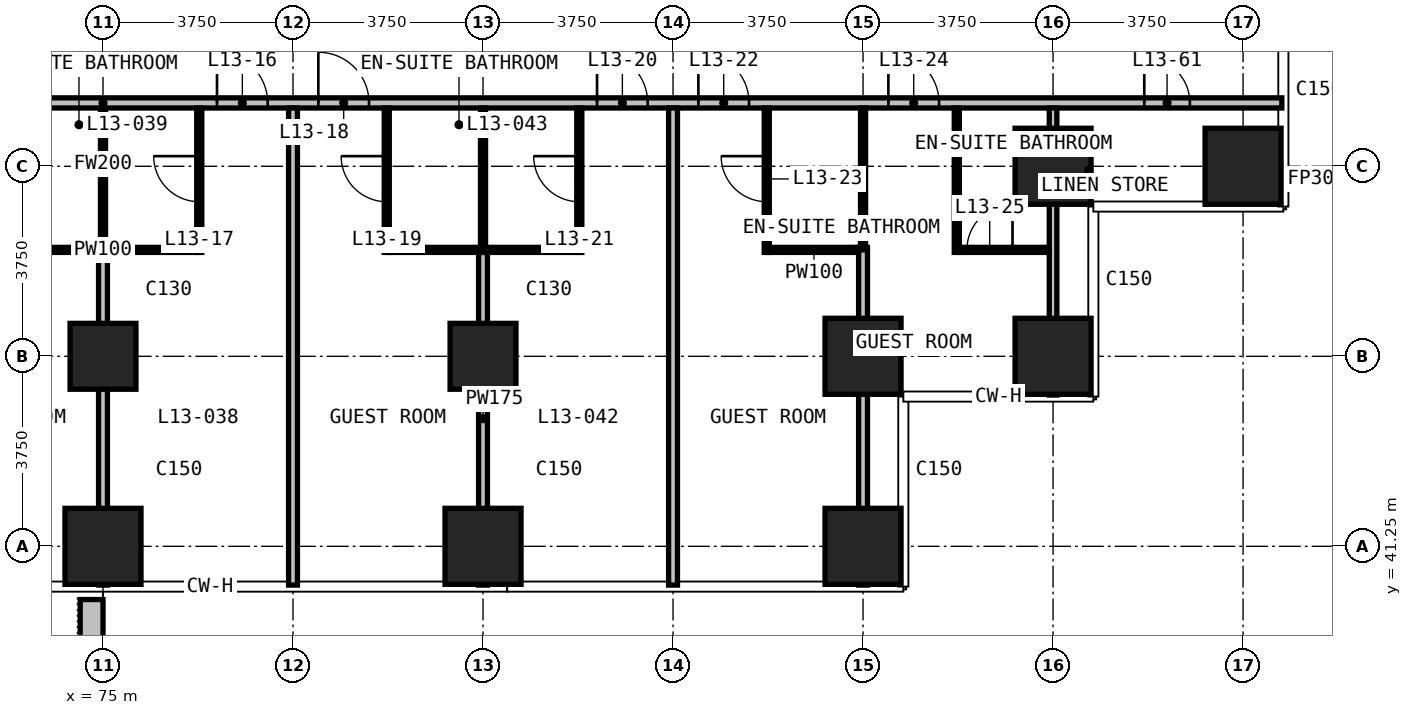
"""IFC4 building model, lengths in metres.
Left out: names, types, materials, properties, quantities, classifications, styles, units other than length and angle.
Written with IfcOpenShell. Run it as: python <this file> out.ifc"""

import sys

from ifc_helpers import new_model, si_unit, direction, frame, frame_2d, origin, origin_2d, place, context, subcontext, project, spatial, rectangle, extrude, element, fill, save


model = new_model("IFC4")
c1 = context("Model", 3, precision=1e-05, world=origin(), true_north=direction((0.0, 1.0)))
c2 = subcontext(c1, "Body", "Model", "MODEL_VIEW")
j1 = project(units=[si_unit("LENGTHUNIT", "METRE"), si_unit("PLANEANGLEUNIT", "RADIAN")], contexts=[c1])
p1 = place(None, origin())
s1 = spatial("IfcSite", under=j1, at=p1, CompositionType="ELEMENT")
p2 = place(p1, origin())
s2 = spatial("IfcBuilding", under=s1, at=p2, CompositionType="ELEMENT")
p3 = place(p2, frame((0.0, 0.0, 62.6)))
s3 = spatial("IfcBuildingStorey", under=s2, at=p3, CompositionType="ELEMENT", Elevation=62.6)
p4 = place(p3, frame((75.0, 41.25, 0.0), z_axis=(0.0, 0.0, 1.0), x_axis=(1.0, 0.0, 0.0)))
e1 = element("IfcColumn", 1, at=p4, inside=s3, PredefinedType="COLUMN", context=c2, shape_type="SweptSolid", body=[
    extrude(rectangle(XDim=1.5, YDim=1.5, at=origin_2d()), origin(), (0.0, 0.0, 1.0), 3.3),
])
p5 = place(p3, frame((75.0, 45.0, 0.0), z_axis=(0.0, 0.0, 1.0), x_axis=(1.0, 0.0, 0.0)))
e2 = element("IfcColumn", 2, at=p5, inside=s3, PredefinedType="COLUMN", context=c2, shape_type="SweptSolid", body=[
    extrude(rectangle(XDim=1.3, YDim=1.3, at=origin_2d()), origin(), (0.0, 0.0, 1.0), 3.3),
])
p6 = place(p3, frame((82.5, 41.25, 0.0), z_axis=(0.0, 0.0, 1.0), x_axis=(1.0, 0.0, 0.0)))
e3 = element("IfcColumn", 3, at=p6, inside=s3, PredefinedType="COLUMN", context=c2, shape_type="SweptSolid", body=[
    extrude(rectangle(XDim=1.5, YDim=1.5, at=origin_2d()), origin(), (0.0, 0.0, 1.0), 3.3),
])
p7 = place(p3, frame((82.5, 45.0, 0.0), z_axis=(0.0, 0.0, 1.0), x_axis=(1.0, 0.0, 0.0)))
e4 = element("IfcColumn", 4, at=p7, inside=s3, PredefinedType="COLUMN", context=c2, shape_type="SweptSolid", body=[
    extrude(rectangle(XDim=1.3, YDim=1.3, at=origin_2d()), origin(), (0.0, 0.0, 1.0), 3.3),
])
for number, where, z_axis, x_axis in (
    (5, (90.0, 41.25, 0.0), (0.0, 0.0, 1.0), (1.0, 0.0, 0.0)),
    (6, (90.0, 45.0, 0.0), (0.0, 0.0, 1.0), (1.0, 0.0, 0.0)),
    (7, (93.75, 45.0, 0.0), (0.0, 0.0, 1.0), (1.0, 0.0, 0.0)),
    (8, (93.75, 48.75, 0.0), (0.0, 0.0, 1.0), (1.0, 0.0, 0.0)),
    (9, (97.5, 48.75, 0.0), (0.0, 0.0, 1.0), (1.0, 0.0, 0.0)),
):
    element("IfcColumn", number, at=place(p3, frame(where, z_axis=z_axis, x_axis=x_axis)), inside=s3, PredefinedType="COLUMN", context=c2, shape_type="SweptSolid", body=[
        extrude(rectangle(XDim=1.5, YDim=1.5, at=origin_2d()), origin(), (0.0, 0.0, 1.0), 3.3),
    ])
p8 = place(p3, frame((74.775, 40.2, 0.0), z_axis=(0.0, 0.0, 1.0), x_axis=(0.0, -1.0, 0.0)))
e10 = element("IfcWall", 10, at=p8, inside=s3, PredefinedType="USERDEFINED", context=c2, shape_type="SweptSolid", body=[
    extrude(rectangle(XDim=2.35, YDim=0.45, at=frame_2d((1.175, 0.0))), origin(), (0.0, 0.0, 1.0), 1.1),
])
p9 = place(p3, frame((51.735, 50.0, 0.0), z_axis=(0.0, 0.0, 1.0), x_axis=(1.0, 0.0, 0.0)))
e11 = element("IfcWall", 11, at=p9, inside=s3, PredefinedType="PARTITIONING", context=c2, shape_type="SweptSolid", body=[
    extrude(rectangle(XDim=46.53, YDim=0.2, at=frame_2d((23.265, 0.0))), origin(), (0.0, 0.0, 1.0), 3.0),
])
p10 = place(p9, frame((6.765, 0.0, 0.0)))
e12 = element("IfcOpeningElement", 12, at=p10, cuts=e11, PredefinedType="OPENING", context=c2, shape_type="SweptSolid", body=[
    extrude(rectangle(XDim=1.0, YDim=2.2, at=frame_2d((0.5, 1.1))), frame((0.0, 0.11, 0.0), z_axis=(0.0, -1.0, 0.0), x_axis=(1.0, 0.0, 0.0)), (0.0, 0.0, 1.0), 0.22),
])
p11 = place(p9, frame((10.515, 0.0, 0.0)))
e13 = element("IfcOpeningElement", 13, at=p11, cuts=e11, PredefinedType="OPENING", context=c2, shape_type="SweptSolid", body=[
    extrude(rectangle(XDim=1.0, YDim=2.2, at=frame_2d((0.5, 1.1))), frame((0.0, 0.11, 0.0), z_axis=(0.0, -1.0, 0.0), x_axis=(1.0, 0.0, 0.0)), (0.0, 0.0, 1.0), 0.22),
])
p12 = place(p9, frame((12.515, 0.0, 0.0)))
e14 = element("IfcOpeningElement", 14, at=p12, cuts=e11, PredefinedType="OPENING", context=c2, shape_type="SweptSolid", body=[
    extrude(rectangle(XDim=1.0, YDim=2.2, at=frame_2d((0.5, 1.1))), frame((0.0, 0.11, 0.0), z_axis=(0.0, -1.0, 0.0), x_axis=(1.0, 0.0, 0.0)), (0.0, 0.0, 1.0), 0.22),
])
p13 = place(p9, frame((18.015, 0.0, 0.0)))
e15 = element("IfcOpeningElement", 15, at=p13, cuts=e11, PredefinedType="OPENING", context=c2, shape_type="SweptSolid", body=[
    extrude(rectangle(XDim=1.0, YDim=2.2, at=frame_2d((0.5, 1.1))), frame((0.0, 0.11, 0.0), z_axis=(0.0, -1.0, 0.0), x_axis=(1.0, 0.0, 0.0)), (0.0, 0.0, 1.0), 0.22),
])
p14 = place(p9, frame((20.015, 0.0, 0.0)))
e16 = element("IfcOpeningElement", 16, at=p14, cuts=e11, PredefinedType="OPENING", context=c2, shape_type="SweptSolid", body=[
    extrude(rectangle(XDim=1.0, YDim=2.2, at=frame_2d((0.5, 1.1))), frame((0.0, 0.11, 0.0), z_axis=(0.0, -1.0, 0.0), x_axis=(1.0, 0.0, 0.0)), (0.0, 0.0, 1.0), 0.22),
])
p15 = place(p9, frame((25.515, 0.0, 0.0)))
e17 = element("IfcOpeningElement", 17, at=p15, cuts=e11, PredefinedType="OPENING", context=c2, shape_type="SweptSolid", body=[
    extrude(rectangle(XDim=1.0, YDim=2.2, at=frame_2d((0.5, 1.1))), frame((0.0, 0.11, 0.0), z_axis=(0.0, -1.0, 0.0), x_axis=(1.0, 0.0, 0.0)), (0.0, 0.0, 1.0), 0.22),
])
p16 = place(p9, frame((27.515, 0.0, 0.0)))
e18 = element("IfcOpeningElement", 18, at=p16, cuts=e11, PredefinedType="OPENING", context=c2, shape_type="SweptSolid", body=[
    extrude(rectangle(XDim=1.0, YDim=2.2, at=frame_2d((0.5, 1.1))), frame((0.0, 0.11, 0.0), z_axis=(0.0, -1.0, 0.0), x_axis=(1.0, 0.0, 0.0)), (0.0, 0.0, 1.0), 0.22),
])
p17 = place(p9, frame((33.015, 0.0, 0.0)))
e19 = element("IfcOpeningElement", 19, at=p17, cuts=e11, PredefinedType="OPENING", context=c2, shape_type="SweptSolid", body=[
    extrude(rectangle(XDim=1.0, YDim=2.2, at=frame_2d((0.5, 1.1))), frame((0.0, 0.11, 0.0), z_axis=(0.0, -1.0, 0.0), x_axis=(1.0, 0.0, 0.0)), (0.0, 0.0, 1.0), 0.22),
])
p18 = place(p9, frame((35.015, 0.0, 0.0)))
e20 = element("IfcOpeningElement", 20, at=p18, cuts=e11, PredefinedType="OPENING", context=c2, shape_type="SweptSolid", body=[
    extrude(rectangle(XDim=1.0, YDim=2.2, at=frame_2d((0.5, 1.1))), frame((0.0, 0.11, 0.0), z_axis=(0.0, -1.0, 0.0), x_axis=(1.0, 0.0, 0.0)), (0.0, 0.0, 1.0), 0.22),
])
p19 = place(p9, frame((38.765, 0.0, 0.0)))
e21 = element("IfcOpeningElement", 21, at=p19, cuts=e11, PredefinedType="OPENING", context=c2, shape_type="SweptSolid", body=[
    extrude(rectangle(XDim=1.0, YDim=2.2, at=frame_2d((0.5, 1.1))), frame((0.0, 0.11, 0.0), z_axis=(0.0, -1.0, 0.0), x_axis=(1.0, 0.0, 0.0)), (0.0, 0.0, 1.0), 0.22),
])
p20 = place(p9, frame((1.8, 0.0, 0.0)))
e22 = element("IfcOpeningElement", 22, at=p20, cuts=e11, PredefinedType="OPENING", context=c2, shape_type="SweptSolid", body=[
    extrude(rectangle(XDim=0.9, YDim=2.2, at=frame_2d((0.45, 1.1))), frame((0.0, 0.11, 0.0), z_axis=(0.0, -1.0, 0.0), x_axis=(1.0, 0.0, 0.0)), (0.0, 0.0, 1.0), 0.22),
])
p21 = place(p9, frame((43.815, 0.0, 0.0)))
e23 = element("IfcOpeningElement", 23, at=p21, cuts=e11, PredefinedType="OPENING", context=c2, shape_type="SweptSolid", body=[
    extrude(rectangle(XDim=0.9, YDim=2.2, at=frame_2d((0.45, 1.1))), frame((0.0, 0.11, 0.0), z_axis=(0.0, -1.0, 0.0), x_axis=(1.0, 0.0, 0.0)), (0.0, 0.0, 1.0), 0.22),
])
p22 = place(p3, frame((75.0, 40.485, 0.0), z_axis=(0.0, 0.0, 1.0), x_axis=(0.0, 1.0, 0.0)))
e24 = element("IfcWall", 24, at=p22, inside=s3, PredefinedType="PARTITIONING", context=c2, shape_type="SweptSolid", body=[
    extrude(rectangle(XDim=6.565, YDim=0.175, at=frame_2d((3.282, 0.0))), origin(), (0.0, 0.0, 1.0), 3.0),
])
p23 = place(p3, frame((78.75, 40.485, 0.0), z_axis=(0.0, 0.0, 1.0), x_axis=(0.0, 1.0, 0.0)))
e25 = element("IfcWall", 25, at=p23, inside=s3, PredefinedType="PARTITIONING", context=c2, shape_type="SweptSolid", body=[
    extrude(rectangle(XDim=9.415, YDim=0.175, at=frame_2d((4.708, 0.0))), origin(), (0.0, 0.0, 1.0), 3.0),
])
p24 = place(p3, frame((82.5, 40.485, 0.0), z_axis=(0.0, 0.0, 1.0), x_axis=(0.0, 1.0, 0.0)))
e26 = element("IfcWall", 26, at=p24, inside=s3, PredefinedType="PARTITIONING", context=c2, shape_type="SweptSolid", body=[
    extrude(rectangle(XDim=6.565, YDim=0.175, at=frame_2d((3.282, 0.0))), origin(), (0.0, 0.0, 1.0), 3.0),
])
p25 = place(p3, frame((86.25, 40.485, 0.0), z_axis=(0.0, 0.0, 1.0), x_axis=(0.0, 1.0, 0.0)))
e27 = element("IfcWall", 27, at=p25, inside=s3, PredefinedType="PARTITIONING", context=c2, shape_type="SweptSolid", body=[
    extrude(rectangle(XDim=9.415, YDim=0.175, at=frame_2d((4.708, 0.0))), origin(), (0.0, 0.0, 1.0), 3.0),
])
p26 = place(p3, frame((90.0, 40.485, 0.0), z_axis=(0.0, 0.0, 1.0), x_axis=(0.0, 1.0, 0.0)))
e28 = element("IfcWall", 28, at=p26, inside=s3, PredefinedType="PARTITIONING", context=c2, shape_type="SweptSolid", body=[
    extrude(rectangle(XDim=6.665, YDim=0.175, at=frame_2d((3.333, 0.0))), origin(), (0.0, 0.0, 1.0), 3.0),
])
p27 = place(p3, frame((93.75, 44.235, 0.0), z_axis=(0.0, 0.0, 1.0), x_axis=(0.0, 1.0, 0.0)))
e29 = element("IfcWall", 29, at=p27, inside=s3, PredefinedType="PARTITIONING", context=c2, shape_type="SweptSolid", body=[
    extrude(rectangle(XDim=5.665, YDim=0.15, at=frame_2d((2.833, 0.0))), origin(), (0.0, 0.0, 1.0), 3.0),
])
for number, where, z_axis, x_axis in (
    (30, (73.15, 47.1, 0.0), (0.0, 0.0, 1.0), (1.0, 0.0, 0.0)),
    (31, (80.65, 47.1, 0.0), (0.0, 0.0, 1.0), (1.0, 0.0, 0.0)),
):
    element("IfcWall", number, at=place(p3, frame(where, z_axis=z_axis, x_axis=x_axis)), inside=s3, PredefinedType="PARTITIONING", context=c2, shape_type="SweptSolid", body=[
        extrude(rectangle(XDim=3.7, YDim=0.1, at=frame_2d((1.85, 0.0))), origin(), (0.0, 0.0, 1.0), 3.0),
    ])
p28 = place(p3, frame((88.15, 47.1, 0.0), z_axis=(0.0, 0.0, 1.0), x_axis=(1.0, 0.0, 0.0)))
e32 = element("IfcWall", 32, at=p28, inside=s3, PredefinedType="PARTITIONING", context=c2, shape_type="SweptSolid", body=[
    extrude(rectangle(XDim=1.762, YDim=0.1, at=frame_2d((0.881, 0.0))), origin(), (0.0, 0.0, 1.0), 3.0),
])
p29 = place(p3, frame((91.9, 47.1, 0.0), z_axis=(0.0, 0.0, 1.0), x_axis=(1.0, 0.0, 0.0)))
e33 = element("IfcWall", 33, at=p29, inside=s3, PredefinedType="PARTITIONING", context=c2, shape_type="SweptSolid", body=[
    extrude(rectangle(XDim=1.775, YDim=0.1, at=frame_2d((0.888, 0.0))), origin(), (0.0, 0.0, 1.0), 3.0),
])
p30 = place(p29, frame((0.15, 0.0, 0.0)))
e34 = element("IfcOpeningElement", 34, at=p30, cuts=e33, PredefinedType="OPENING", context=c2, shape_type="SweptSolid", body=[
    extrude(rectangle(XDim=0.9, YDim=2.2, at=frame_2d((0.45, 1.1))), frame((0.0, 0.06, 0.0), z_axis=(0.0, -1.0, 0.0), x_axis=(1.0, 0.0, 0.0)), (0.0, 0.0, 1.0), 0.12),
])
p31 = place(p3, frame((75.0, 47.15, 0.0), z_axis=(0.0, 0.0, 1.0), x_axis=(0.0, 1.0, 0.0)))
e35 = element("IfcWall", 35, at=p31, inside=s3, PredefinedType="PARTITIONING", context=c2, shape_type="SweptSolid", body=[
    extrude(rectangle(XDim=2.75, YDim=0.1, at=frame_2d((1.375, 0.0))), origin(), (0.0, 0.0, 1.0), 3.0),
])
p32 = place(p3, frame((76.9, 47.05, 0.0), z_axis=(0.0, 0.0, 1.0), x_axis=(0.0, 1.0, 0.0)))
e36 = element("IfcWall", 36, at=p32, inside=s3, PredefinedType="PARTITIONING", context=c2, shape_type="SweptSolid", body=[
    extrude(rectangle(XDim=2.85, YDim=0.1, at=frame_2d((1.425, 0.0))), origin(), (0.0, 0.0, 1.0), 3.0),
])
p33 = place(p32, frame((1.0, 0.0, 0.0)))
e37 = element("IfcOpeningElement", 37, at=p33, cuts=e36, PredefinedType="OPENING", context=c2, shape_type="SweptSolid", body=[
    extrude(rectangle(XDim=0.9, YDim=2.2, at=frame_2d((0.45, 1.1))), frame((0.0, 0.06, 0.0), z_axis=(0.0, -1.0, 0.0), x_axis=(1.0, 0.0, 0.0)), (0.0, 0.0, 1.0), 0.12),
])
p34 = place(p3, frame((80.6, 47.05, 0.0), z_axis=(0.0, 0.0, 1.0), x_axis=(0.0, 1.0, 0.0)))
e38 = element("IfcWall", 38, at=p34, inside=s3, PredefinedType="PARTITIONING", context=c2, shape_type="SweptSolid", body=[
    extrude(rectangle(XDim=2.85, YDim=0.1, at=frame_2d((1.425, 0.0))), origin(), (0.0, 0.0, 1.0), 3.0),
])
p35 = place(p34, frame((1.0, 0.0, 0.0)))
e39 = element("IfcOpeningElement", 39, at=p35, cuts=e38, PredefinedType="OPENING", context=c2, shape_type="SweptSolid", body=[
    extrude(rectangle(XDim=0.9, YDim=2.2, at=frame_2d((0.45, 1.1))), frame((0.0, 0.06, 0.0), z_axis=(0.0, -1.0, 0.0), x_axis=(1.0, 0.0, 0.0)), (0.0, 0.0, 1.0), 0.12),
])
p36 = place(p3, frame((82.5, 47.15, 0.0), z_axis=(0.0, 0.0, 1.0), x_axis=(0.0, 1.0, 0.0)))
e40 = element("IfcWall", 40, at=p36, inside=s3, PredefinedType="PARTITIONING", context=c2, shape_type="SweptSolid", body=[
    extrude(rectangle(XDim=2.75, YDim=0.1, at=frame_2d((1.375, 0.0))), origin(), (0.0, 0.0, 1.0), 3.0),
])
p37 = place(p3, frame((84.4, 47.05, 0.0), z_axis=(0.0, 0.0, 1.0), x_axis=(0.0, 1.0, 0.0)))
e41 = element("IfcWall", 41, at=p37, inside=s3, PredefinedType="PARTITIONING", context=c2, shape_type="SweptSolid", body=[
    extrude(rectangle(XDim=2.85, YDim=0.1, at=frame_2d((1.425, 0.0))), origin(), (0.0, 0.0, 1.0), 3.0),
])
p38 = place(p37, frame((1.0, 0.0, 0.0)))
e42 = element("IfcOpeningElement", 42, at=p38, cuts=e41, PredefinedType="OPENING", context=c2, shape_type="SweptSolid", body=[
    extrude(rectangle(XDim=0.9, YDim=2.2, at=frame_2d((0.45, 1.1))), frame((0.0, 0.06, 0.0), z_axis=(0.0, -1.0, 0.0), x_axis=(1.0, 0.0, 0.0)), (0.0, 0.0, 1.0), 0.12),
])
p39 = place(p3, frame((88.1, 47.05, 0.0), z_axis=(0.0, 0.0, 1.0), x_axis=(0.0, 1.0, 0.0)))
e43 = element("IfcWall", 43, at=p39, inside=s3, PredefinedType="PARTITIONING", context=c2, shape_type="SweptSolid", body=[
    extrude(rectangle(XDim=2.85, YDim=0.1, at=frame_2d((1.425, 0.0))), origin(), (0.0, 0.0, 1.0), 3.0),
])
p40 = place(p39, frame((1.0, 0.0, 0.0)))
e44 = element("IfcOpeningElement", 44, at=p40, cuts=e43, PredefinedType="OPENING", context=c2, shape_type="SweptSolid", body=[
    extrude(rectangle(XDim=0.9, YDim=2.2, at=frame_2d((0.45, 1.1))), frame((0.0, 0.06, 0.0), z_axis=(0.0, -1.0, 0.0), x_axis=(1.0, 0.0, 0.0)), (0.0, 0.0, 1.0), 0.12),
])
p41 = place(p3, frame((90.0, 47.1, 0.0), z_axis=(0.0, 0.0, 1.0), x_axis=(0.0, 1.0, 0.0)))
e45 = element("IfcWall", 45, at=p41, inside=s3, PredefinedType="PARTITIONING", context=c2, shape_type="SweptSolid", body=[
    extrude(rectangle(XDim=2.8, YDim=0.1, at=frame_2d((1.4, 0.0))), origin(), (0.0, 0.0, 1.0), 3.0),
])
p42 = place(p3, frame((91.85, 47.05, 0.0), z_axis=(0.0, 0.0, 1.0), x_axis=(0.0, 1.0, 0.0)))
e46 = element("IfcWall", 46, at=p42, inside=s3, PredefinedType="PARTITIONING", context=c2, shape_type="SweptSolid", body=[
    extrude(rectangle(XDim=2.85, YDim=0.1, at=frame_2d((1.425, 0.0))), origin(), (0.0, 0.0, 1.0), 3.0),
])
p43 = place(p15, origin())
e47 = element("IfcDoor", 47, at=p43, inside=s3, OperationType="SINGLE_SWING_LEFT", PredefinedType="DOOR", context=c2, shape_type="SweptSolid", body=[
    extrude(rectangle(XDim=1.0, YDim=2.2, at=frame_2d((0.5, 1.1))), frame((0.0, 0.025, 0.0), z_axis=(0.0, -1.0, 0.0), x_axis=(1.0, 0.0, 0.0)), (0.0, 0.0, 1.0), 0.05),
])
fill(e17, e47)
p44 = place(p33, origin())
e48 = element("IfcDoor", 48, at=p44, inside=s3, OperationType="SINGLE_SWING_RIGHT", PredefinedType="DOOR", context=c2, shape_type="SweptSolid", body=[
    extrude(rectangle(XDim=0.9, YDim=2.2, at=frame_2d((0.45, 1.1))), frame((0.0, 0.025, 0.0), z_axis=(0.0, -1.0, 0.0), x_axis=(1.0, 0.0, 0.0)), (0.0, 0.0, 1.0), 0.05),
])
fill(e37, e48)
p45 = place(p16, origin())
e49 = element("IfcDoor", 49, at=p45, inside=s3, OperationType="SINGLE_SWING_LEFT", PredefinedType="DOOR", context=c2, shape_type="SweptSolid", body=[
    extrude(rectangle(XDim=1.0, YDim=2.2, at=frame_2d((0.5, 1.1))), frame((0.0, 0.025, 0.0), z_axis=(0.0, -1.0, 0.0), x_axis=(1.0, 0.0, 0.0)), (0.0, 0.0, 1.0), 0.05),
])
fill(e18, e49)
p46 = place(p35, origin())
e50 = element("IfcDoor", 50, at=p46, inside=s3, OperationType="SINGLE_SWING_RIGHT", PredefinedType="DOOR", context=c2, shape_type="SweptSolid", body=[
    extrude(rectangle(XDim=0.9, YDim=2.2, at=frame_2d((0.45, 1.1))), frame((0.0, 0.025, 0.0), z_axis=(0.0, -1.0, 0.0), x_axis=(1.0, 0.0, 0.0)), (0.0, 0.0, 1.0), 0.05),
])
fill(e39, e50)
p47 = place(p17, origin())
e51 = element("IfcDoor", 51, at=p47, inside=s3, OperationType="SINGLE_SWING_LEFT", PredefinedType="DOOR", context=c2, shape_type="SweptSolid", body=[
    extrude(rectangle(XDim=1.0, YDim=2.2, at=frame_2d((0.5, 1.1))), frame((0.0, 0.025, 0.0), z_axis=(0.0, -1.0, 0.0), x_axis=(1.0, 0.0, 0.0)), (0.0, 0.0, 1.0), 0.05),
])
fill(e19, e51)
p48 = place(p38, origin())
e52 = element("IfcDoor", 52, at=p48, inside=s3, OperationType="SINGLE_SWING_RIGHT", PredefinedType="DOOR", context=c2, shape_type="SweptSolid", body=[
    extrude(rectangle(XDim=0.9, YDim=2.2, at=frame_2d((0.45, 1.1))), frame((0.0, 0.025, 0.0), z_axis=(0.0, -1.0, 0.0), x_axis=(1.0, 0.0, 0.0)), (0.0, 0.0, 1.0), 0.05),
])
fill(e42, e52)
p49 = place(p18, origin())
e53 = element("IfcDoor", 53, at=p49, inside=s3, OperationType="SINGLE_SWING_LEFT", PredefinedType="DOOR", context=c2, shape_type="SweptSolid", body=[
    extrude(rectangle(XDim=1.0, YDim=2.2, at=frame_2d((0.5, 1.1))), frame((0.0, 0.025, 0.0), z_axis=(0.0, -1.0, 0.0), x_axis=(1.0, 0.0, 0.0)), (0.0, 0.0, 1.0), 0.05),
])
fill(e20, e53)
p50 = place(p40, origin())
e54 = element("IfcDoor", 54, at=p50, inside=s3, OperationType="SINGLE_SWING_RIGHT", PredefinedType="DOOR", context=c2, shape_type="SweptSolid", body=[
    extrude(rectangle(XDim=0.9, YDim=2.2, at=frame_2d((0.45, 1.1))), frame((0.0, 0.025, 0.0), z_axis=(0.0, -1.0, 0.0), x_axis=(1.0, 0.0, 0.0)), (0.0, 0.0, 1.0), 0.05),
])
fill(e44, e54)
p51 = place(p19, origin())
e55 = element("IfcDoor", 55, at=p51, inside=s3, OperationType="SINGLE_SWING_RIGHT", PredefinedType="DOOR", context=c2, shape_type="SweptSolid", body=[
    extrude(rectangle(XDim=1.0, YDim=2.2, at=frame_2d((0.5, 1.1))), frame((0.0, 0.025, 0.0), z_axis=(0.0, -1.0, 0.0), x_axis=(1.0, 0.0, 0.0)), (0.0, 0.0, 1.0), 0.05),
])
fill(e21, e55)
p52 = place(p30, origin())
e56 = element("IfcDoor", 56, at=p52, inside=s3, OperationType="SINGLE_SWING_RIGHT", PredefinedType="DOOR", context=c2, shape_type="SweptSolid", body=[
    extrude(rectangle(XDim=0.9, YDim=2.2, at=frame_2d((0.45, 1.1))), frame((0.0, 0.025, 0.0), z_axis=(0.0, -1.0, 0.0), x_axis=(1.0, 0.0, 0.0)), (0.0, 0.0, 1.0), 0.05),
])
fill(e34, e56)
p53 = place(p21, origin())
e57 = element("IfcDoor", 57, at=p53, inside=s3, OperationType="SINGLE_SWING_LEFT", PredefinedType="DOOR", context=c2, shape_type="SweptSolid", body=[
    extrude(rectangle(XDim=0.9, YDim=2.2, at=frame_2d((0.45, 1.1))), frame((0.0, 0.025, 0.0), z_axis=(0.0, -1.0, 0.0), x_axis=(1.0, 0.0, 0.0)), (0.0, 0.0, 1.0), 0.05),
])
fill(e23, e57)
save(model, sys.argv[1])
